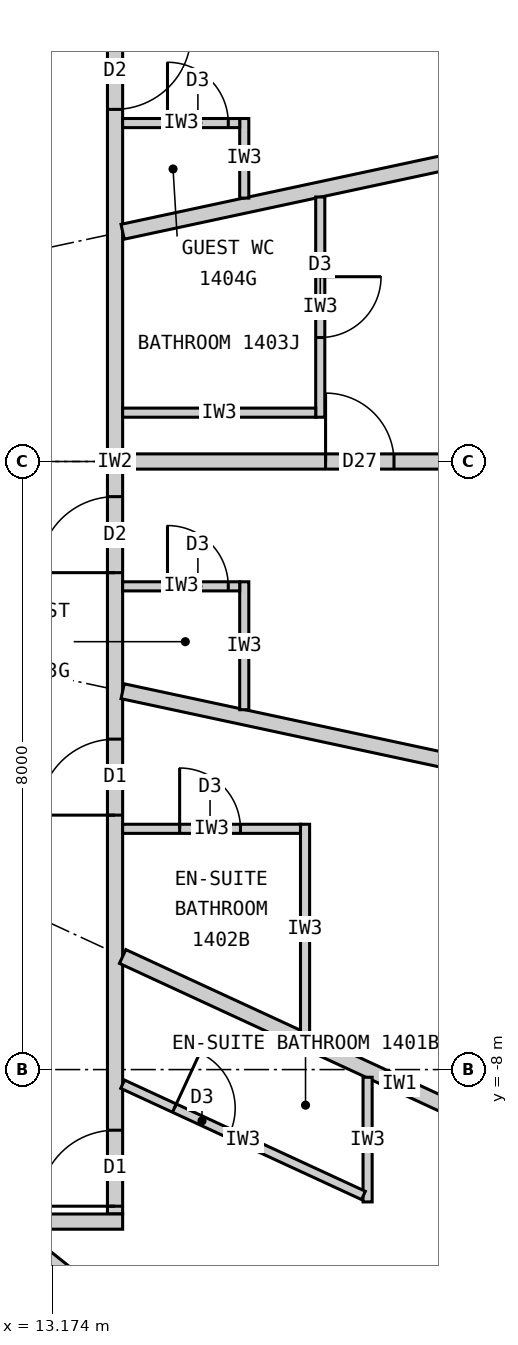
"""IFC4 building model, lengths in metres.
Left out: names, types, materials, properties, quantities, classifications, styles, units other than length and angle.
Written with IfcOpenShell. Run it as: python <this file> out.ifc"""

import sys

from ifc_helpers import new_model, si_unit, direction, frame, frame_2d, origin, place, context, subcontext, project, spatial, rectangle, extrude, element, fill, save


model = new_model("IFC4")
c1 = context("Model", 3, precision=1e-05, world=origin(), true_north=direction((0.0, 1.0)))
c2 = subcontext(c1, "Body", "Model", "MODEL_VIEW")
j1 = project(units=[si_unit("LENGTHUNIT", "METRE"), si_unit("PLANEANGLEUNIT", "RADIAN")], contexts=[c1])
p1 = place(None, origin())
s1 = spatial("IfcSite", under=j1, at=p1, CompositionType="ELEMENT")
p2 = place(p1, origin())
s2 = spatial("IfcBuilding", under=s1, at=p2, CompositionType="ELEMENT")
p3 = place(p2, frame((0.0, 0.0, 60.6)))
s3 = spatial("IfcBuildingStorey", under=s2, at=p3, CompositionType="ELEMENT", Elevation=60.6)
p4 = place(p3, frame((14.0, -9.9, 0.0), z_axis=(0.0, 0.0, 1.0), x_axis=(0.0, 1.0, 0.0)))
e1 = element("IfcWall", 1, at=p4, inside=s3, PredefinedType="PARTITIONING", context=c2, shape_type="SweptSolid", body=[
    extrude(rectangle(XDim=19.8, YDim=0.2, at=frame_2d((9.9, 0.0))), origin(), (0.0, 0.0, 1.0), 3.12),
])
p5 = place(p4, frame((0.103, 0.0, 0.0)))
e2 = element("IfcOpeningElement", 2, at=p5, cuts=e1, PredefinedType="OPENING", context=c2, shape_type="SweptSolid", body=[
    extrude(rectangle(XDim=1.0, YDim=2.2, at=frame_2d((0.5, 1.1))), frame((0.0, 0.11, 0.0), z_axis=(0.0, -1.0, 0.0), x_axis=(1.0, 0.0, 0.0)), (0.0, 0.0, 1.0), 0.22),
])
p6 = place(p4, frame((5.248, 0.0, 0.0)))
e3 = element("IfcOpeningElement", 3, at=p6, cuts=e1, PredefinedType="OPENING", context=c2, shape_type="SweptSolid", body=[
    extrude(rectangle(XDim=1.0, YDim=2.2, at=frame_2d((0.5, 1.1))), frame((0.0, 0.11, 0.0), z_axis=(0.0, -1.0, 0.0), x_axis=(1.0, 0.0, 0.0)), (0.0, 0.0, 1.0), 0.22),
])
p7 = place(p4, frame((8.438, 0.0, 0.0)))
e4 = element("IfcOpeningElement", 4, at=p7, cuts=e1, PredefinedType="OPENING", context=c2, shape_type="SweptSolid", body=[
    extrude(rectangle(XDim=1.0, YDim=2.2, at=frame_2d((0.5, 1.1))), frame((0.0, 0.11, 0.0), z_axis=(0.0, -1.0, 0.0), x_axis=(1.0, 0.0, 0.0)), (0.0, 0.0, 1.0), 0.22),
])
p8 = place(p4, frame((14.532, 0.0, 0.0)))
e5 = element("IfcOpeningElement", 5, at=p8, cuts=e1, PredefinedType="OPENING", context=c2, shape_type="SweptSolid", body=[
    extrude(rectangle(XDim=1.0, YDim=2.2, at=frame_2d((0.5, 1.1))), frame((0.0, 0.11, 0.0), z_axis=(0.0, -1.0, 0.0), x_axis=(1.0, 0.0, 0.0)), (0.0, 0.0, 1.0), 0.22),
])
p9 = place(p3, frame((14.1, -10.0, 0.0), z_axis=(0.0, 0.0, 1.0), x_axis=(-1.0, 0.0, 0.0)))
e6 = element("IfcWall", 6, at=p9, inside=s3, PredefinedType="PARTITIONING", context=c2, shape_type="SweptSolid", body=[
    extrude(rectangle(XDim=28.2, YDim=0.2, at=frame_2d((14.1, 0.0))), origin(), (0.0, 0.0, 1.0), 3.12),
])
p10 = place(p9, frame((23.865, 0.0, 0.0)))
e7 = element("IfcOpeningElement", 7, at=p10, cuts=e6, PredefinedType="OPENING", context=c2, shape_type="SweptSolid", body=[
    extrude(rectangle(XDim=1.0, YDim=2.2, at=frame_2d((0.5, 1.1))), frame((0.0, 0.11, 0.0), z_axis=(0.0, -1.0, 0.0), x_axis=(1.0, 0.0, 0.0)), (0.0, 0.0, 1.0), 0.22),
])
p11 = place(p9, frame((18.529, 0.0, 0.0)))
e8 = element("IfcOpeningElement", 8, at=p11, cuts=e6, PredefinedType="OPENING", context=c2, shape_type="SweptSolid", body=[
    extrude(rectangle(XDim=1.0, YDim=2.2, at=frame_2d((0.5, 1.1))), frame((0.0, 0.11, 0.0), z_axis=(0.0, -1.0, 0.0), x_axis=(1.0, 0.0, 0.0)), (0.0, 0.0, 1.0), 0.22),
])
p12 = place(p9, frame((14.623, 0.0, 0.0)))
e9 = element("IfcOpeningElement", 9, at=p12, cuts=e6, PredefinedType="OPENING", context=c2, shape_type="SweptSolid", body=[
    extrude(rectangle(XDim=1.0, YDim=2.2, at=frame_2d((0.5, 1.1))), frame((0.0, 0.11, 0.0), z_axis=(0.0, -1.0, 0.0), x_axis=(1.0, 0.0, 0.0)), (0.0, 0.0, 1.0), 0.22),
])
p13 = place(p9, frame((11.24, 0.0, 0.0)))
e10 = element("IfcOpeningElement", 10, at=p13, cuts=e6, PredefinedType="OPENING", context=c2, shape_type="SweptSolid", body=[
    extrude(rectangle(XDim=1.0, YDim=2.2, at=frame_2d((0.5, 1.1))), frame((0.0, 0.11, 0.0), z_axis=(0.0, -1.0, 0.0), x_axis=(1.0, 0.0, 0.0)), (0.0, 0.0, 1.0), 0.22),
])
p14 = place(p9, frame((8.671, 0.0, 0.0)))
e11 = element("IfcOpeningElement", 11, at=p14, cuts=e6, PredefinedType="OPENING", context=c2, shape_type="SweptSolid", body=[
    extrude(rectangle(XDim=1.0, YDim=2.2, at=frame_2d((0.5, 1.1))), frame((0.0, 0.11, 0.0), z_axis=(0.0, -1.0, 0.0), x_axis=(1.0, 0.0, 0.0)), (0.0, 0.0, 1.0), 0.22),
])
p15 = place(p9, frame((2.801, 0.0, 0.0)))
e12 = element("IfcOpeningElement", 12, at=p15, cuts=e6, PredefinedType="OPENING", context=c2, shape_type="SweptSolid", body=[
    extrude(rectangle(XDim=1.0, YDim=2.2, at=frame_2d((0.5, 1.1))), frame((0.0, 0.11, 0.0), z_axis=(0.0, -1.0, 0.0), x_axis=(1.0, 0.0, 0.0)), (0.0, 0.0, 1.0), 0.22),
])
p16 = place(p3, frame((14.1, 0.0, 0.0), z_axis=(0.0, 0.0, 1.0), x_axis=(1.0, 0.0, 0.0)))
e13 = element("IfcWall", 13, at=p16, inside=s3, PredefinedType="PARTITIONING", context=c2, shape_type="SweptSolid", body=[
    extrude(rectangle(XDim=10.75, YDim=0.2, at=frame_2d((5.375, 0.0))), origin(), (0.0, 0.0, 1.0), 2.27),
])
p17 = place(p16, frame((2.67, 0.0, 0.0)))
e14 = element("IfcOpeningElement", 14, at=p17, cuts=e13, PredefinedType="OPENING", context=c2, shape_type="SweptSolid", body=[
    extrude(rectangle(XDim=0.9, YDim=2.1, at=frame_2d((0.45, 1.05))), frame((0.0, 0.11, 0.0), z_axis=(0.0, -1.0, 0.0), x_axis=(1.0, 0.0, 0.0)), (0.0, 0.0, 1.0), 0.22),
])
p18 = place(p3, frame((14.1, 3.022, 0.0), z_axis=(0.0, 0.0, 1.0), x_axis=(0.977790014929, 0.209586943072, 0.0)))
e15 = element("IfcWall", 15, at=p18, inside=s3, PredefinedType="PARTITIONING", context=c2, shape_type="SweptSolid", body=[
    extrude(rectangle(XDim=10.087, YDim=0.2, at=frame_2d((5.043, 0.0))), origin(), (0.0, 0.0, 1.0), 2.32),
])
p19 = place(p3, frame((12.625, -10.1, 0.0), z_axis=(0.0, 0.0, 1.0), x_axis=(0.780892451574, -0.624665493744, 0.0)))
e16 = element("IfcWall", 16, at=p19, inside=s3, PredefinedType="PARTITIONING", context=c2, shape_type="SweptSolid", body=[
    extrude(rectangle(XDim=6.045, YDim=0.2, at=frame_2d((3.022, 0.0))), origin(), (0.0, 0.0, 1.0), 2.32),
])
p20 = place(p3, frame((14.1, -6.512, 0.0), z_axis=(0.0, 0.0, 1.0), x_axis=(0.907832871056, -0.419332181247, 0.0)))
e17 = element("IfcWall", 17, at=p20, inside=s3, PredefinedType="PARTITIONING", context=c2, shape_type="SweptSolid", body=[
    extrude(rectangle(XDim=8.023, YDim=0.2, at=frame_2d((4.011, 0.0))), origin(), (0.0, 0.0, 1.0), 2.32),
])
p21 = place(p3, frame((14.1, -3.022, 0.0), z_axis=(0.0, 0.0, 1.0), x_axis=(0.977790014929, -0.209586943072, 0.0)))
e18 = element("IfcWall", 18, at=p21, inside=s3, PredefinedType="PARTITIONING", context=c2, shape_type="SweptSolid", body=[
    extrude(rectangle(XDim=10.087, YDim=0.2, at=frame_2d((5.043, 0.0))), origin(), (0.0, 0.0, 1.0), 2.32),
])
p22 = place(p3, frame((17.323, -8.101, 0.0), z_axis=(0.0, 0.0, 1.0), x_axis=(0.0, -1.0, 0.0)))
e19 = element("IfcWall", 19, at=p22, inside=s3, PredefinedType="PARTITIONING", context=c2, shape_type="SweptSolid", body=[
    extrude(rectangle(XDim=1.64, YDim=0.12, at=frame_2d((0.82, 0.0))), origin(), (0.0, 0.0, 1.0), 3.12),
])
p23 = place(p3, frame((14.1, -8.193, 0.0), z_axis=(0.0, 0.0, 1.0), x_axis=(0.907836493557, -0.419324338628, 0.0)))
e20 = element("IfcWall", 20, at=p23, inside=s3, PredefinedType="PARTITIONING", context=c2, shape_type="SweptSolid", body=[
    extrude(rectangle(XDim=3.49, YDim=0.12, at=frame_2d((1.745, 0.0))), origin(), (0.0, 0.0, 1.0), 3.12),
])
p24 = place(p23, frame((0.75, 0.0, 0.0)))
e21 = element("IfcOpeningElement", 21, at=p24, cuts=e20, PredefinedType="OPENING", context=c2, shape_type="SweptSolid", body=[
    extrude(rectangle(XDim=0.8, YDim=2.1, at=frame_2d((0.4, 1.05))), frame((0.0, 0.07, 0.0), z_axis=(0.0, -1.0, 0.0), x_axis=(1.0, 0.0, 0.0)), (0.0, 0.0, 1.0), 0.14),
])
p25 = place(p3, frame((16.5, -7.521, 0.0), z_axis=(0.0, 0.0, 1.0), x_axis=(0.0, 1.0, 0.0)))
e22 = element("IfcWall", 22, at=p25, inside=s3, PredefinedType="PARTITIONING", context=c2, shape_type="SweptSolid", body=[
    extrude(rectangle(XDim=2.749, YDim=0.12, at=frame_2d((1.374, 0.0))), origin(), (0.0, 0.0, 1.0), 3.12),
])
p26 = place(p3, frame((14.1, -4.833, 0.0), z_axis=(0.0, 0.0, 1.0), x_axis=(1.0, 0.0, 0.0)))
e23 = element("IfcWall", 23, at=p26, inside=s3, PredefinedType="PARTITIONING", context=c2, shape_type="SweptSolid", body=[
    extrude(rectangle(XDim=2.34, YDim=0.12, at=frame_2d((1.17, 0.0))), origin(), (0.0, 0.0, 1.0), 3.12),
])
p27 = place(p26, frame((0.75, 0.0, 0.0)))
e24 = element("IfcOpeningElement", 24, at=p27, cuts=e23, PredefinedType="OPENING", context=c2, shape_type="SweptSolid", body=[
    extrude(rectangle(XDim=0.8, YDim=2.1, at=frame_2d((0.4, 1.05))), frame((0.0, 0.07, 0.0), z_axis=(0.0, -1.0, 0.0), x_axis=(1.0, 0.0, 0.0)), (0.0, 0.0, 1.0), 0.14),
])
p28 = place(p3, frame((15.7, -3.265, 0.0), z_axis=(0.0, 0.0, 1.0), x_axis=(0.0, 1.0, 0.0)))
e25 = element("IfcWall", 25, at=p28, inside=s3, PredefinedType="PARTITIONING", context=c2, shape_type="SweptSolid", body=[
    extrude(rectangle(XDim=1.683, YDim=0.12, at=frame_2d((0.841, 0.0))), origin(), (0.0, 0.0, 1.0), 3.12),
])
p29 = place(p3, frame((14.1, -1.643, 0.0), z_axis=(0.0, 0.0, 1.0), x_axis=(1.0, 0.0, 0.0)))
e26 = element("IfcWall", 26, at=p29, inside=s3, PredefinedType="PARTITIONING", context=c2, shape_type="SweptSolid", body=[
    extrude(rectangle(XDim=1.54, YDim=0.12, at=frame_2d((0.77, 0.0))), origin(), (0.0, 0.0, 1.0), 2.32),
])
p30 = place(p29, frame((0.59, 0.0, 0.0)))
e27 = element("IfcOpeningElement", 27, at=p30, cuts=e26, PredefinedType="OPENING", context=c2, shape_type="SweptSolid", body=[
    extrude(rectangle(XDim=0.8, YDim=2.1, at=frame_2d((0.4, 1.05))), frame((0.0, 0.07, 0.0), z_axis=(0.0, -1.0, 0.0), x_axis=(1.0, 0.0, 0.0)), (0.0, 0.0, 1.0), 0.14),
])
p31 = place(p3, frame((16.7, 3.48, 0.0), z_axis=(0.0, 0.0, 1.0), x_axis=(0.0, -1.0, 0.0)))
e28 = element("IfcWall", 28, at=p31, inside=s3, PredefinedType="PARTITIONING", context=c2, shape_type="SweptSolid", body=[
    extrude(rectangle(XDim=2.897, YDim=0.12, at=frame_2d((1.449, 0.0))), origin(), (0.0, 0.0, 1.0), 3.12),
])
p32 = place(p31, frame((1.049, 0.0, 0.0)))
e29 = element("IfcOpeningElement", 29, at=p32, cuts=e28, PredefinedType="OPENING", context=c2, shape_type="SweptSolid", body=[
    extrude(rectangle(XDim=0.8, YDim=2.1, at=frame_2d((0.4, 1.05))), frame((0.0, 0.07, 0.0), z_axis=(0.0, -1.0, 0.0), x_axis=(1.0, 0.0, 0.0)), (0.0, 0.0, 1.0), 0.14),
])
p33 = place(p3, frame((14.1, 0.643, 0.0), z_axis=(0.0, 0.0, 1.0), x_axis=(1.0, 0.0, 0.0)))
e30 = element("IfcWall", 30, at=p33, inside=s3, PredefinedType="PARTITIONING", context=c2, shape_type="SweptSolid", body=[
    extrude(rectangle(XDim=2.54, YDim=0.12, at=frame_2d((1.27, 0.0))), origin(), (0.0, 0.0, 1.0), 3.12),
])
p34 = place(p3, frame((15.7, 3.465, 0.0), z_axis=(0.0, 0.0, 1.0), x_axis=(0.0, 1.0, 0.0)))
e31 = element("IfcWall", 31, at=p34, inside=s3, PredefinedType="PARTITIONING", context=c2, shape_type="SweptSolid", body=[
    extrude(rectangle(XDim=1.047, YDim=0.12, at=frame_2d((0.523, 0.0))), origin(), (0.0, 0.0, 1.0), 3.12),
])
p35 = place(p3, frame((14.1, 4.452, 0.0), z_axis=(0.0, 0.0, 1.0), x_axis=(1.0, 0.0, 0.0)))
e32 = element("IfcWall", 32, at=p35, inside=s3, PredefinedType="PARTITIONING", context=c2, shape_type="SweptSolid", body=[
    extrude(rectangle(XDim=1.54, YDim=0.12, at=frame_2d((0.77, 0.0))), origin(), (0.0, 0.0, 1.0), 3.12),
])
p36 = place(p35, frame((0.59, 0.0, 0.0)))
e33 = element("IfcOpeningElement", 33, at=p36, cuts=e32, PredefinedType="OPENING", context=c2, shape_type="SweptSolid", body=[
    extrude(rectangle(XDim=0.8, YDim=2.1, at=frame_2d((0.4, 1.05))), frame((0.0, 0.07, 0.0), z_axis=(0.0, -1.0, 0.0), x_axis=(1.0, 0.0, 0.0)), (0.0, 0.0, 1.0), 0.14),
])
p37 = place(p24, origin())
e34 = element("IfcDoor", 34, at=p37, inside=s3, OperationType="SINGLE_SWING_LEFT", PredefinedType="DOOR", context=c2, shape_type="SweptSolid", body=[
    extrude(rectangle(XDim=0.8, YDim=2.1, at=frame_2d((0.4, 1.05))), frame((0.0, 0.025, 0.0), z_axis=(0.0, -1.0, 0.0), x_axis=(1.0, 0.0, 0.0)), (0.0, 0.0, 1.0), 0.05),
])
fill(e21, e34)
p38 = place(p5, origin())
e35 = element("IfcDoor", 35, at=p38, inside=s3, OperationType="SINGLE_SWING_LEFT", PredefinedType="DOOR", context=c2, shape_type="SweptSolid", body=[
    extrude(rectangle(XDim=1.0, YDim=2.2, at=frame_2d((0.5, 1.1))), frame((0.0, 0.025, 0.0), z_axis=(0.0, -1.0, 0.0), x_axis=(1.0, 0.0, 0.0)), (0.0, 0.0, 1.0), 0.05),
])
fill(e2, e35)
p39 = place(p27, origin())
e36 = element("IfcDoor", 36, at=p39, inside=s3, OperationType="SINGLE_SWING_LEFT", PredefinedType="DOOR", context=c2, shape_type="SweptSolid", body=[
    extrude(rectangle(XDim=0.8, YDim=2.1, at=frame_2d((0.4, 1.05))), frame((0.0, 0.025, 0.0), z_axis=(0.0, -1.0, 0.0), x_axis=(1.0, 0.0, 0.0)), (0.0, 0.0, 1.0), 0.05),
])
fill(e24, e36)
p40 = place(p6, origin())
e37 = element("IfcDoor", 37, at=p40, inside=s3, OperationType="SINGLE_SWING_LEFT", PredefinedType="DOOR", context=c2, shape_type="SweptSolid", body=[
    extrude(rectangle(XDim=1.0, YDim=2.2, at=frame_2d((0.5, 1.1))), frame((0.0, 0.025, 0.0), z_axis=(0.0, -1.0, 0.0), x_axis=(1.0, 0.0, 0.0)), (0.0, 0.0, 1.0), 0.05),
])
fill(e3, e37)
p41 = place(p30, origin())
e38 = element("IfcDoor", 38, at=p41, inside=s3, OperationType="SINGLE_SWING_LEFT", PredefinedType="DOOR", context=c2, shape_type="SweptSolid", body=[
    extrude(rectangle(XDim=0.8, YDim=2.1, at=frame_2d((0.4, 1.05))), frame((0.0, 0.025, 0.0), z_axis=(0.0, -1.0, 0.0), x_axis=(1.0, 0.0, 0.0)), (0.0, 0.0, 1.0), 0.05),
])
fill(e27, e38)
p42 = place(p7, origin())
e39 = element("IfcDoor", 39, at=p42, inside=s3, OperationType="SINGLE_SWING_LEFT", PredefinedType="DOOR", context=c2, shape_type="SweptSolid", body=[
    extrude(rectangle(XDim=1.0, YDim=2.2, at=frame_2d((0.5, 1.1))), frame((0.0, 0.025, 0.0), z_axis=(0.0, -1.0, 0.0), x_axis=(1.0, 0.0, 0.0)), (0.0, 0.0, 1.0), 0.05),
])
fill(e4, e39)
p43 = place(p32, origin())
e40 = element("IfcDoor", 40, at=p43, inside=s3, OperationType="SINGLE_SWING_LEFT", PredefinedType="DOOR", context=c2, shape_type="SweptSolid", body=[
    extrude(rectangle(XDim=0.8, YDim=2.1, at=frame_2d((0.4, 1.05))), frame((0.0, 0.025, 0.0), z_axis=(0.0, -1.0, 0.0), x_axis=(1.0, 0.0, 0.0)), (0.0, 0.0, 1.0), 0.05),
])
fill(e29, e40)
p44 = place(p17, origin())
e41 = element("IfcDoor", 41, at=p44, inside=s3, OperationType="SINGLE_SWING_LEFT", PredefinedType="DOOR", context=c2, shape_type="SweptSolid", body=[
    extrude(rectangle(XDim=0.9, YDim=2.1, at=frame_2d((0.45, 1.05))), frame((0.0, 0.025, 0.0), z_axis=(0.0, -1.0, 0.0), x_axis=(1.0, 0.0, 0.0)), (0.0, 0.0, 1.0), 0.05),
])
fill(e14, e41)
p45 = place(p36, origin())
e42 = element("IfcDoor", 42, at=p45, inside=s3, OperationType="SINGLE_SWING_LEFT", PredefinedType="DOOR", context=c2, shape_type="SweptSolid", body=[
    extrude(rectangle(XDim=0.8, YDim=2.1, at=frame_2d((0.4, 1.05))), frame((0.0, 0.025, 0.0), z_axis=(0.0, -1.0, 0.0), x_axis=(1.0, 0.0, 0.0)), (0.0, 0.0, 1.0), 0.05),
])
fill(e33, e42)
p46 = place(p8, origin())
e43 = element("IfcDoor", 43, at=p46, inside=s3, OperationType="SINGLE_SWING_RIGHT", PredefinedType="DOOR", context=c2, shape_type="SweptSolid", body=[
    extrude(rectangle(XDim=1.0, YDim=2.2, at=frame_2d((0.5, 1.1))), frame((0.0, 0.025, 0.0), z_axis=(0.0, -1.0, 0.0), x_axis=(1.0, 0.0, 0.0)), (0.0, 0.0, 1.0), 0.05),
])
fill(e5, e43)
save(model, sys.argv[1])
